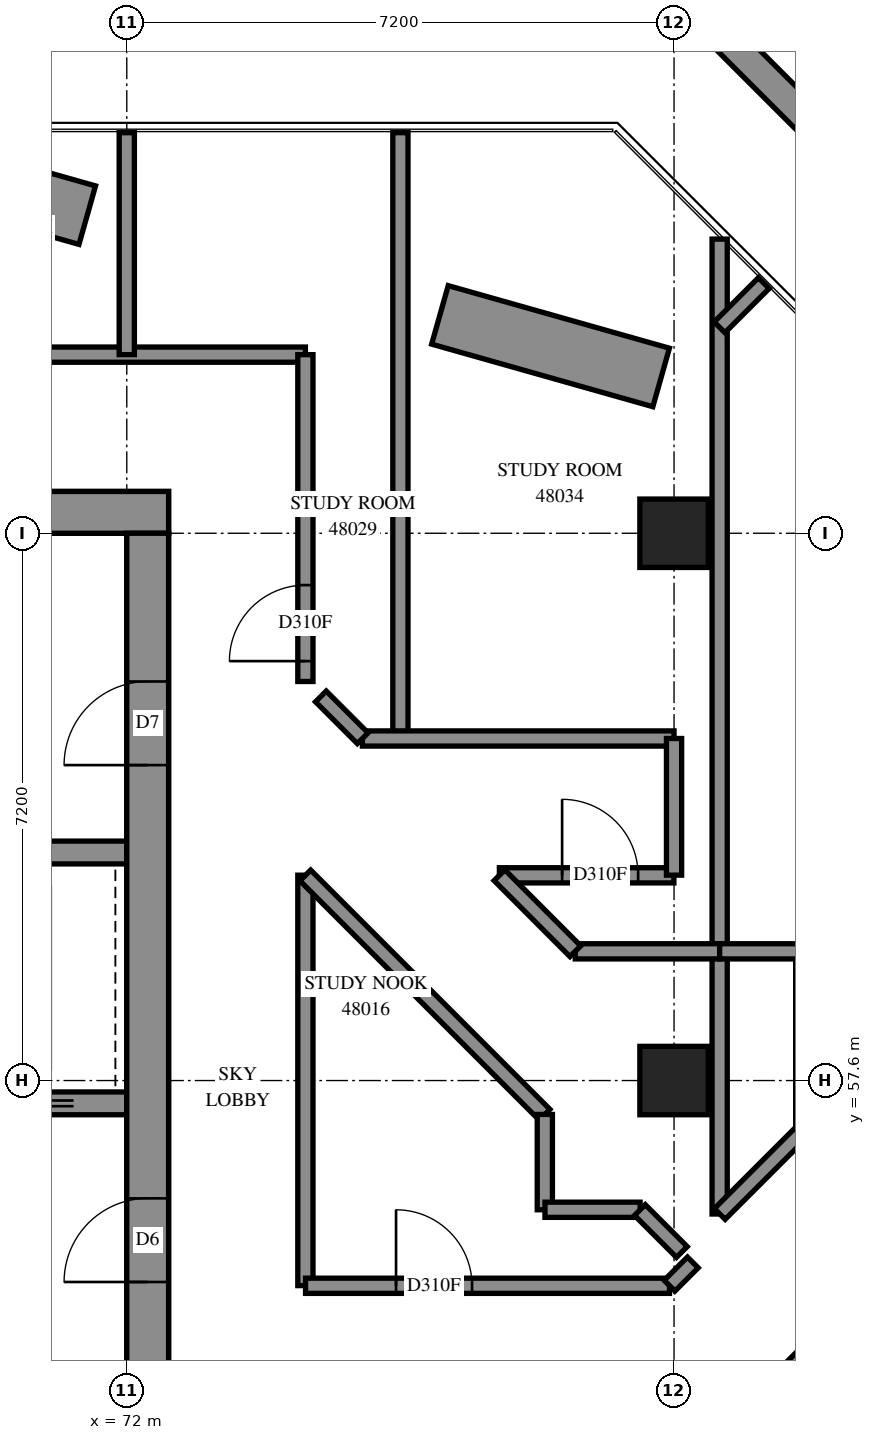
"""IFC4 building model, lengths in metres.
Left out: names, types, materials, properties, quantities, classifications, styles, units other than length and angle.
Written with IfcOpenShell. Run it as: python <this file> out.ifc"""

import sys

from ifc_helpers import new_model, si_unit, direction, frame, frame_2d, origin, origin_2d, place, context, subcontext, project, spatial, polyline, rectangle, outline, extrude, element, fill, save


model = new_model("IFC4")
c1 = context("Model", 3, precision=1e-05, world=origin(), true_north=direction((0.0, 1.0)))
c2 = subcontext(c1, "Body", "Model", "MODEL_VIEW")
j1 = project(units=[si_unit("LENGTHUNIT", "METRE"), si_unit("PLANEANGLEUNIT", "RADIAN")], contexts=[c1])
p1 = place(None, origin())
s1 = spatial("IfcSite", under=j1, at=p1, CompositionType="ELEMENT")
p2 = place(p1, origin())
s2 = spatial("IfcBuilding", under=s1, at=p2, CompositionType="ELEMENT")
p3 = place(p2, frame((0.0, 0.0, 176.2)))
s3 = spatial("IfcBuildingStorey", under=s2, at=p3, CompositionType="ELEMENT", Elevation=176.2)
for number, where, z_axis, x_axis in (
    (1, (79.2, 57.6, 0.0), (0.0, 0.0, 1.0), (1.0, 0.0, 0.0)),
    (2, (79.2, 64.8, 0.0), (0.0, 0.0, 1.0), (1.0, 0.0, 0.0)),
):
    element("IfcColumn", number, at=place(p3, frame(where, z_axis=z_axis, x_axis=x_axis)), inside=s3, PredefinedType="COLUMN", context=c2, shape_type="SweptSolid", body=[
        extrude(rectangle(XDim=0.9, YDim=0.9, at=origin_2d()), origin(), (0.0, 0.0, 1.0), 3.9),
    ])
p4 = place(p3, frame((57.05, 65.075, -0.3), z_axis=(0.0, 0.0, 1.0), x_axis=(1.0, 0.0, 0.0)))
e3 = element("IfcWall", 3, at=p4, inside=s3, PredefinedType="SHEAR", context=c2, shape_type="SweptSolid", body=[
    extrude(rectangle(XDim=15.5, YDim=0.55, at=frame_2d((7.75, 0.0))), origin(), (0.0, 0.0, 1.0), 3.5),
])
p5 = place(p4, frame((10.55, 0.0, 0.3)))
e4 = element("IfcOpeningElement", 4, at=p5, cuts=e3, PredefinedType="OPENING", context=c2, shape_type="SweptSolid", body=[
    extrude(rectangle(XDim=0.8, YDim=2.1, at=frame_2d((0.4, 1.05))), frame((0.0, 0.285, 0.0), z_axis=(0.0, -1.0, 0.0), x_axis=(1.0, 0.0, 0.0)), (0.0, 0.0, 1.0), 0.57),
])
p6 = place(p3, frame((72.275, 50.4, -0.3), z_axis=(0.0, 0.0, 1.0), x_axis=(0.0, 1.0, 0.0)))
e5 = element("IfcWall", 5, at=p6, inside=s3, PredefinedType="SHEAR", context=c2, shape_type="SweptSolid", body=[
    extrude(rectangle(XDim=14.4, YDim=0.55, at=frame_2d((7.2, 0.0))), origin(), (0.0, 0.0, 1.0), 3.5),
])
p7 = place(p6, frame((4.55, 0.0, 0.3)))
e6 = element("IfcOpeningElement", 6, at=p7, cuts=e5, PredefinedType="OPENING", context=c2, shape_type="SweptSolid", body=[
    extrude(rectangle(XDim=1.1, YDim=2.1, at=frame_2d((0.55, 1.05))), frame((0.0, 0.285, 0.0), z_axis=(0.0, -1.0, 0.0), x_axis=(1.0, 0.0, 0.0)), (0.0, 0.0, 1.0), 0.57),
])
p8 = place(p6, frame((11.35, 0.0, 0.3)))
e7 = element("IfcOpeningElement", 7, at=p8, cuts=e5, PredefinedType="OPENING", context=c2, shape_type="SweptSolid", body=[
    extrude(rectangle(XDim=1.1, YDim=2.1, at=frame_2d((0.55, 1.05))), frame((0.0, 0.285, 0.0), z_axis=(0.0, -1.0, 0.0), x_axis=(1.0, 0.0, 0.0)), (0.0, 0.0, 1.0), 0.57),
])
p9 = place(p3, frame((57.6, 57.3, 0.0), z_axis=(0.0, 0.0, 1.0), x_axis=(1.0, 0.0, 0.0)))
e8 = element("IfcWall", 8, at=p9, inside=s3, PredefinedType="SOLIDWALL", context=c2, shape_type="SweptSolid", body=[
    extrude(rectangle(XDim=14.4, YDim=0.3, at=frame_2d((7.2, 0.0))), origin(), (0.0, 0.0, 1.0), 3.9),
])
p10 = place(p9, frame((1.25, 0.0, 0.0)))
e9 = element("IfcOpeningElement", 9, at=p10, cuts=e8, PredefinedType="OPENING", context=c2, shape_type="SweptSolid", body=[
    extrude(rectangle(XDim=1.1, YDim=2.1, at=frame_2d((0.55, 1.05))), frame((0.0, 0.16, 0.0), z_axis=(0.0, -1.0, 0.0), x_axis=(1.0, 0.0, 0.0)), (0.0, 0.0, 1.0), 0.32),
])
p11 = place(p9, frame((4.85, 0.0, 0.0)))
e10 = element("IfcOpeningElement", 10, at=p11, cuts=e8, PredefinedType="OPENING", context=c2, shape_type="SweptSolid", body=[
    extrude(rectangle(XDim=1.1, YDim=2.1, at=frame_2d((0.55, 1.05))), frame((0.0, 0.16, 0.0), z_axis=(0.0, -1.0, 0.0), x_axis=(1.0, 0.0, 0.0)), (0.0, 0.0, 1.0), 0.32),
])
p12 = place(p9, frame((8.45, 0.0, 0.0)))
e11 = element("IfcOpeningElement", 11, at=p12, cuts=e8, PredefinedType="OPENING", context=c2, shape_type="SweptSolid", body=[
    extrude(rectangle(XDim=1.1, YDim=2.1, at=frame_2d((0.55, 1.05))), frame((0.0, 0.16, 0.0), z_axis=(0.0, -1.0, 0.0), x_axis=(1.0, 0.0, 0.0)), (0.0, 0.0, 1.0), 0.32),
])
p13 = place(p9, frame((12.05, 0.0, 0.0)))
e12 = element("IfcOpeningElement", 12, at=p13, cuts=e8, PredefinedType="OPENING", context=c2, shape_type="SweptSolid", body=[
    extrude(rectangle(XDim=1.1, YDim=2.1, at=frame_2d((0.55, 1.05))), frame((0.0, 0.16, 0.0), z_axis=(0.0, -1.0, 0.0), x_axis=(1.0, 0.0, 0.0)), (0.0, 0.0, 1.0), 0.32),
])
p14 = place(p3, frame((64.8, 60.6, 0.0), z_axis=(0.0, 0.0, 1.0), x_axis=(1.0, 0.0, 0.0)))
e13 = element("IfcWall", 13, at=p14, inside=s3, PredefinedType="SOLIDWALL", context=c2, shape_type="SweptSolid", body=[
    extrude(rectangle(XDim=7.2, YDim=0.3, at=frame_2d((3.6, 0.0))), origin(), (0.0, 0.0, 1.0), 3.9),
])
p15 = place(p3, frame((76.46, 49.284, -0.3), z_axis=(0.0, 0.0, 1.0), x_axis=(0.7071067812, 0.7071067812, 0.0)))
e14 = element("IfcWall", 14, at=p15, inside=s3, PredefinedType="SHEAR", context=c2, shape_type="SweptSolid", body=[
    extrude(rectangle(XDim=14.4, YDim=0.55, at=frame_2d((7.2, 0.0))), origin(), (0.0, 0.0, 1.0), 3.5),
])
p16 = place(p15, frame((4.55, 0.0, 0.3)))
e15 = element("IfcOpeningElement", 15, at=p16, cuts=e14, PredefinedType="OPENING", context=c2, shape_type="SweptSolid", body=[
    extrude(rectangle(XDim=1.1, YDim=2.1, at=frame_2d((0.55, 1.05))), frame((0.0, 0.285, 0.0), z_axis=(0.0, -1.0, 0.0), x_axis=(1.0, 0.0, 0.0)), (0.0, 0.0, 1.0), 0.57),
])
p17 = place(p15, frame((11.35, 0.0, 0.3)))
e16 = element("IfcOpeningElement", 16, at=p17, cuts=e14, PredefinedType="OPENING", context=c2, shape_type="SweptSolid", body=[
    extrude(rectangle(XDim=1.1, YDim=2.1, at=frame_2d((0.55, 1.05))), frame((0.0, 0.285, 0.0), z_axis=(0.0, -1.0, 0.0), x_axis=(1.0, 0.0, 0.0)), (0.0, 0.0, 1.0), 0.57),
])
p18 = place(p3, frame((79.03, 66.85, 0.0), z_axis=(0.0, 0.0, 1.0), x_axis=(-0.9622591579, 0.2721347332, 0.0)))
e17 = element("IfcWall", 17, at=p18, inside=s3, PredefinedType="SOLIDWALL", context=c2, shape_type="SweptSolid", body=[
    extrude(rectangle(XDim=3.024, YDim=0.8, at=frame_2d((1.512, 0.0))), origin(), (0.0, 0.0, 1.0), 0.65),
])
p19 = place(p3, frame((71.48, 68.985, 0.0), z_axis=(0.0, 0.0, 1.0), x_axis=(-0.962258062, 0.2721386082, 0.0)))
e18 = element("IfcWall", 18, at=p19, inside=s3, PredefinedType="SOLIDWALL", context=c2, shape_type="SweptSolid", body=[
    extrude(rectangle(XDim=2.66, YDim=0.8, at=frame_2d((1.33, 0.0))), origin(), (0.0, 0.0, 1.0), 0.65),
])
p20 = place(p3, frame((102.747, 49.938, 0.0), z_axis=(0.0, 0.0, 1.0), x_axis=(-0.7071083109, 0.7071052514, 0.0)))
e19 = element("IfcWall", 19, at=p20, inside=s3, PredefinedType="SOLIDWALL", context=c2, shape_type="SweptSolid", body=[
    extrude(outline(polyline([(-0.1, -0.1), (32.726, -0.1), (32.644, 0.1), (0.1, 0.1), (-0.1, -0.1)])), origin(), (0.0, 0.0, 1.0), 4.2),
])
p21 = place(p3, frame((55.25, 67.15, 0.0), z_axis=(0.0, 0.0, 1.0), x_axis=(1.0, 0.0, 0.0)))
e20 = element("IfcWall", 20, at=p21, inside=s3, PredefinedType="PARTITIONING", context=c2, shape_type="SweptSolid", body=[
    extrude(rectangle(XDim=19.1, YDim=0.2, at=frame_2d((9.55, 0.0))), origin(), (0.0, 0.0, 1.0), 3.9),
])
p22 = place(p21, frame((4.442, 0.0, 0.0)))
e21 = element("IfcOpeningElement", 21, at=p22, cuts=e20, PredefinedType="OPENING", context=c2, shape_type="SweptSolid", body=[
    extrude(rectangle(XDim=1.0, YDim=2.1, at=frame_2d((0.5, 1.05))), frame((0.0, 0.11, 0.0), z_axis=(0.0, -1.0, 0.0), x_axis=(1.0, 0.0, 0.0)), (0.0, 0.0, 1.0), 0.22),
])
p23 = place(p21, frame((6.518, 0.0, 0.0)))
e22 = element("IfcOpeningElement", 22, at=p23, cuts=e20, PredefinedType="OPENING", context=c2, shape_type="SweptSolid", body=[
    extrude(rectangle(XDim=1.0, YDim=2.1, at=frame_2d((0.5, 1.05))), frame((0.0, 0.11, 0.0), z_axis=(0.0, -1.0, 0.0), x_axis=(1.0, 0.0, 0.0)), (0.0, 0.0, 1.0), 0.22),
])
p24 = place(p21, frame((11.643, 0.0, 0.0)))
e23 = element("IfcOpeningElement", 23, at=p24, cuts=e20, PredefinedType="OPENING", context=c2, shape_type="SweptSolid", body=[
    extrude(rectangle(XDim=1.0, YDim=2.1, at=frame_2d((0.5, 1.05))), frame((0.0, 0.11, 0.0), z_axis=(0.0, -1.0, 0.0), x_axis=(1.0, 0.0, 0.0)), (0.0, 0.0, 1.0), 0.22),
])
p25 = place(p21, frame((13.717, 0.0, 0.0)))
e24 = element("IfcOpeningElement", 24, at=p25, cuts=e20, PredefinedType="OPENING", context=c2, shape_type="SweptSolid", body=[
    extrude(rectangle(XDim=1.0, YDim=2.1, at=frame_2d((0.5, 1.05))), frame((0.0, 0.11, 0.0), z_axis=(0.0, -1.0, 0.0), x_axis=(1.0, 0.0, 0.0)), (0.0, 0.0, 1.0), 0.22),
])
p26 = place(p3, frame((79.8, 59.3, 0.0), z_axis=(0.0, 0.0, 1.0), x_axis=(0.0, 1.0, 0.0)))
e25 = element("IfcWall", 25, at=p26, inside=s3, PredefinedType="PARTITIONING", context=c2, shape_type="SweptSolid", body=[
    extrude(rectangle(XDim=9.37, YDim=0.2, at=frame_2d((4.685, 0.0))), origin(), (0.0, 0.0, 1.0), 3.9),
])
p27 = place(p3, frame((75.6, 62.1, 0.0), z_axis=(0.0, 0.0, 1.0), x_axis=(0.0, 1.0, 0.0)))
e26 = element("IfcWall", 26, at=p27, inside=s3, PredefinedType="PARTITIONING", context=c2, shape_type="SweptSolid", body=[
    extrude(rectangle(XDim=7.97, YDim=0.2, at=frame_2d((3.985, 0.0))), origin(), (0.0, 0.0, 1.0), 3.9),
])
p28 = place(p3, frame((74.35, 54.902, 0.0), z_axis=(0.0, 0.0, 1.0), x_axis=(0.0, 1.0, 0.0)))
e27 = element("IfcWall", 27, at=p28, inside=s3, PredefinedType="PARTITIONING", context=c2, shape_type="SweptSolid", body=[
    extrude(rectangle(XDim=5.4, YDim=0.2, at=frame_2d((2.7, 0.0))), origin(), (0.0, 0.0, 1.0), 3.9),
])
p29 = place(p3, frame((74.352, 54.9, 0.0), z_axis=(0.0, 0.0, 1.0), x_axis=(1.0, 0.0, 0.0)))
e28 = element("IfcWall", 28, at=p29, inside=s3, PredefinedType="PARTITIONING", context=c2, shape_type="SweptSolid", body=[
    extrude(rectangle(XDim=4.788, YDim=0.2, at=frame_2d((2.394, 0.0))), origin(), (0.0, 0.0, 1.0), 3.9),
])
p30 = place(p29, frame((1.19, 0.0, 0.0)))
e29 = element("IfcOpeningElement", 29, at=p30, cuts=e28, PredefinedType="OPENING", context=c2, shape_type="SweptSolid", body=[
    extrude(rectangle(XDim=1.0, YDim=2.1, at=frame_2d((0.5, 1.05))), frame((0.0, 0.11, 0.0), z_axis=(0.0, -1.0, 0.0), x_axis=(1.0, 0.0, 0.0)), (0.0, 0.0, 1.0), 0.22),
])
p31 = place(p3, frame((74.349, 60.299, 0.0), z_axis=(0.0, 0.0, 1.0), x_axis=(0.7071067812, -0.7071067812, 0.0)))
e30 = element("IfcWall", 30, at=p31, inside=s3, PredefinedType="PARTITIONING", context=c2, shape_type="SweptSolid", body=[
    extrude(rectangle(XDim=4.452, YDim=0.2, at=frame_2d((2.226, 0.0))), origin(), (0.0, 0.0, 1.0), 3.9),
])
p32 = place(p3, frame((74.35, 62.85, 0.0), z_axis=(0.0, 0.0, 1.0), x_axis=(0.0, 1.0, 0.0)))
e31 = element("IfcWall", 31, at=p32, inside=s3, PredefinedType="PARTITIONING", context=c2, shape_type="SweptSolid", body=[
    extrude(rectangle(XDim=4.3, YDim=0.2, at=frame_2d((2.15, 0.0))), origin(), (0.0, 0.0, 1.0), 3.9),
])
p33 = place(p32, frame((0.268, 0.0, 0.0)))
e32 = element("IfcOpeningElement", 32, at=p33, cuts=e31, PredefinedType="OPENING", context=c2, shape_type="SweptSolid", body=[
    extrude(rectangle(XDim=1.0, YDim=2.1, at=frame_2d((0.5, 1.05))), frame((0.0, 0.11, 0.0), z_axis=(0.0, -1.0, 0.0), x_axis=(1.0, 0.0, 0.0)), (0.0, 0.0, 1.0), 0.22),
])
p34 = place(p3, frame((75.1, 62.1, 0.0), z_axis=(0.0, 0.0, 1.0), x_axis=(1.0, 0.0, 0.0)))
e33 = element("IfcWall", 33, at=p34, inside=s3, PredefinedType="PARTITIONING", context=c2, shape_type="SweptSolid", body=[
    extrude(rectangle(XDim=4.1, YDim=0.2, at=frame_2d((2.05, 0.0))), origin(), (0.0, 0.0, 1.0), 3.9),
])
p35 = place(p3, frame((79.8, 55.844, 0.0), z_axis=(0.0, 0.0, 1.0), x_axis=(0.0, 1.0, 0.0)))
e34 = element("IfcWall", 34, at=p35, inside=s3, PredefinedType="PARTITIONING", context=c2, shape_type="SweptSolid", body=[
    extrude(rectangle(XDim=3.456, YDim=0.2, at=frame_2d((1.728, 0.0))), origin(), (0.0, 0.0, 1.0), 3.9),
])
p36 = place(p3, frame((72.0, 67.15, 0.0), z_axis=(0.0, 0.0, 1.0), x_axis=(0.0, 1.0, 0.0)))
e35 = element("IfcWall", 35, at=p36, inside=s3, PredefinedType="PARTITIONING", context=c2, shape_type="SweptSolid", body=[
    extrude(rectangle(XDim=2.92, YDim=0.2, at=frame_2d((1.46, 0.0))), origin(), (0.0, 0.0, 1.0), 3.9),
])
p37 = place(p3, frame((76.902, 60.3, 0.0), z_axis=(0.0, 0.0, 1.0), x_axis=(1.0, 0.0, 0.0)))
e36 = element("IfcWall", 36, at=p37, inside=s3, PredefinedType="PARTITIONING", context=c2, shape_type="SweptSolid", body=[
    extrude(rectangle(XDim=2.296, YDim=0.2, at=frame_2d((1.148, 0.0))), origin(), (0.0, 0.0, 1.0), 3.9),
])
p38 = place(p37, frame((0.825, 0.0, 0.0)))
e37 = element("IfcOpeningElement", 37, at=p38, cuts=e36, PredefinedType="OPENING", context=c2, shape_type="SweptSolid", body=[
    extrude(rectangle(XDim=1.0, YDim=2.1, at=frame_2d((0.5, 1.05))), frame((0.0, 0.11, 0.0), z_axis=(0.0, -1.0, 0.0), x_axis=(1.0, 0.0, 0.0)), (0.0, 0.0, 1.0), 0.22),
])
p39 = place(p3, frame((77.9, 59.3, 0.0), z_axis=(0.0, 0.0, 1.0), x_axis=(1.0, 0.0, 0.0)))
e38 = element("IfcWall", 38, at=p39, inside=s3, PredefinedType="PARTITIONING", context=c2, shape_type="SweptSolid", body=[
    extrude(rectangle(XDim=1.9, YDim=0.2, at=frame_2d((0.95, 0.0))), origin(), (0.0, 0.0, 1.0), 3.9),
])
p40 = place(p3, frame((79.2, 60.302, 0.0), z_axis=(0.0, 0.0, 1.0), x_axis=(0.0, 1.0, 0.0)))
e39 = element("IfcWall", 39, at=p40, inside=s3, PredefinedType="PARTITIONING", context=c2, shape_type="SweptSolid", body=[
    extrude(rectangle(XDim=1.798, YDim=0.2, at=frame_2d((0.899, 0.0))), origin(), (0.0, 0.0, 1.0), 3.9),
])
p41 = place(p3, frame((79.801, 55.845, 0.0), z_axis=(0.0, 0.0, 1.0), x_axis=(0.7071067812, 0.7071067812, 0.0)))
e40 = element("IfcWall", 40, at=p41, inside=s3, PredefinedType="PARTITIONING", context=c2, shape_type="SweptSolid", body=[
    extrude(rectangle(XDim=1.553, YDim=0.2, at=frame_2d((0.776, 0.0))), origin(), (0.0, 0.0, 1.0), 3.9),
])
p42 = place(p3, frame((76.903, 60.301, 0.0), z_axis=(0.0, 0.0, 1.0), x_axis=(0.7063986127, -0.7078142412, 0.0)))
e41 = element("IfcWall", 41, at=p42, inside=s3, PredefinedType="PARTITIONING", context=c2, shape_type="SweptSolid", body=[
    extrude(rectangle(XDim=1.413, YDim=0.2, at=frame_2d((0.706, 0.0))), origin(), (0.0, 0.0, 1.0), 3.9),
])
p43 = place(p3, frame((77.5, 55.9, 0.0), z_axis=(0.0, 0.0, 1.0), x_axis=(0.0, 1.0, 0.0)))
e42 = element("IfcWall", 42, at=p43, inside=s3, PredefinedType="PARTITIONING", context=c2, shape_type="SweptSolid", body=[
    extrude(rectangle(XDim=1.254, YDim=0.2, at=frame_2d((0.627, 0.0))), origin(), (0.0, 0.0, 1.0), 3.9),
])
p44 = place(p3, frame((77.502, 55.9, 0.0), z_axis=(0.0, 0.0, 1.0), x_axis=(1.0, 0.0, 0.0)))
e43 = element("IfcWall", 43, at=p44, inside=s3, PredefinedType="PARTITIONING", context=c2, shape_type="SweptSolid", body=[
    extrude(rectangle(XDim=1.252, YDim=0.2, at=frame_2d((0.626, 0.0))), origin(), (0.0, 0.0, 1.0), 3.9),
])
p45 = place(p3, frame((79.8, 59.3, 0.0), z_axis=(0.0, 0.0, 1.0), x_axis=(1.0, 0.0, 0.0)))
e44 = element("IfcWall", 44, at=p45, inside=s3, PredefinedType="PARTITIONING", context=c2, shape_type="SweptSolid", body=[
    extrude(rectangle(XDim=1.098, YDim=0.2, at=frame_2d((0.549, 0.0))), origin(), (0.0, 0.0, 1.0), 3.9),
])
p46 = place(p3, frame((79.799, 67.509, 0.0), z_axis=(0.0, 0.0, 1.0), x_axis=(0.7071067812, 0.7071067812, 0.0)))
e45 = element("IfcWall", 45, at=p46, inside=s3, PredefinedType="PARTITIONING", context=c2, shape_type="SweptSolid", body=[
    extrude(rectangle(XDim=0.823, YDim=0.2, at=frame_2d((0.412, 0.0))), origin(), (0.0, 0.0, 1.0), 3.9),
])
p47 = place(p3, frame((78.751, 55.897, 0.0), z_axis=(0.0, 0.0, 1.0), x_axis=(0.7071067812, -0.7071067812, 0.0)))
e46 = element("IfcWall", 46, at=p47, inside=s3, PredefinedType="PARTITIONING", context=c2, shape_type="SweptSolid", body=[
    extrude(rectangle(XDim=0.781, YDim=0.2, at=frame_2d((0.39, 0.0))), origin(), (0.0, 0.0, 1.0), 3.9),
])
p48 = place(p3, frame((74.553, 62.654, 0.0), z_axis=(0.0, 0.0, 1.0), x_axis=(0.7071067812, -0.7071067812, 0.0)))
e47 = element("IfcWall", 47, at=p48, inside=s3, PredefinedType="PARTITIONING", context=c2, shape_type="SweptSolid", body=[
    extrude(rectangle(XDim=0.778, YDim=0.2, at=frame_2d((0.389, 0.0))), origin(), (0.0, 0.0, 1.0), 3.9),
])
p49 = place(p3, frame((79.141, 54.901, 0.0), z_axis=(0.0, 0.0, 1.0), x_axis=(0.7071067812, 0.7071067812, 0.0)))
e48 = element("IfcWall", 48, at=p49, inside=s3, PredefinedType="PARTITIONING", context=c2, shape_type="SweptSolid", body=[
    extrude(rectangle(XDim=0.433, YDim=0.2, at=frame_2d((0.216, 0.0))), origin(), (0.0, 0.0, 1.0), 3.9),
])
p50 = place(p7, origin())
e49 = element("IfcDoor", 49, at=p50, inside=s3, OperationType="DOUBLE_DOOR_SINGLE_SWING", PredefinedType="DOOR", context=c2, shape_type="SweptSolid", body=[
    extrude(rectangle(XDim=1.1, YDim=2.1, at=frame_2d((0.55, 1.05))), frame((0.0, 0.025, 0.0), z_axis=(0.0, -1.0, 0.0), x_axis=(1.0, 0.0, 0.0)), (0.0, 0.0, 1.0), 0.05),
])
fill(e6, e49)
p51 = place(p8, origin())
e50 = element("IfcDoor", 50, at=p51, inside=s3, OperationType="SINGLE_SWING_RIGHT", PredefinedType="DOOR", context=c2, shape_type="SweptSolid", body=[
    extrude(rectangle(XDim=1.1, YDim=2.1, at=frame_2d((0.55, 1.05))), frame((0.0, 0.025, 0.0), z_axis=(0.0, -1.0, 0.0), x_axis=(1.0, 0.0, 0.0)), (0.0, 0.0, 1.0), 0.05),
])
fill(e7, e50)
p52 = place(p30, origin())
e51 = element("IfcDoor", 51, at=p52, inside=s3, OperationType="SINGLE_SWING_LEFT", PredefinedType="DOOR", context=c2, shape_type="SweptSolid", body=[
    extrude(rectangle(XDim=1.0, YDim=2.1, at=frame_2d((0.5, 1.05))), frame((0.0, 0.025, 0.0), z_axis=(0.0, -1.0, 0.0), x_axis=(1.0, 0.0, 0.0)), (0.0, 0.0, 1.0), 0.05),
])
fill(e29, e51)
p53 = place(p33, origin())
e52 = element("IfcDoor", 52, at=p53, inside=s3, OperationType="SINGLE_SWING_RIGHT", PredefinedType="DOOR", context=c2, shape_type="SweptSolid", body=[
    extrude(rectangle(XDim=1.0, YDim=2.1, at=frame_2d((0.5, 1.05))), frame((0.0, 0.025, 0.0), z_axis=(0.0, -1.0, 0.0), x_axis=(1.0, 0.0, 0.0)), (0.0, 0.0, 1.0), 0.05),
])
fill(e32, e52)
p54 = place(p38, origin())
e53 = element("IfcDoor", 53, at=p54, inside=s3, OperationType="SINGLE_SWING_LEFT", PredefinedType="DOOR", context=c2, shape_type="SweptSolid", body=[
    extrude(rectangle(XDim=1.0, YDim=2.1, at=frame_2d((0.5, 1.05))), frame((0.0, 0.025, 0.0), z_axis=(0.0, -1.0, 0.0), x_axis=(1.0, 0.0, 0.0)), (0.0, 0.0, 1.0), 0.05),
])
fill(e37, e53)
save(model, sys.argv[1])
